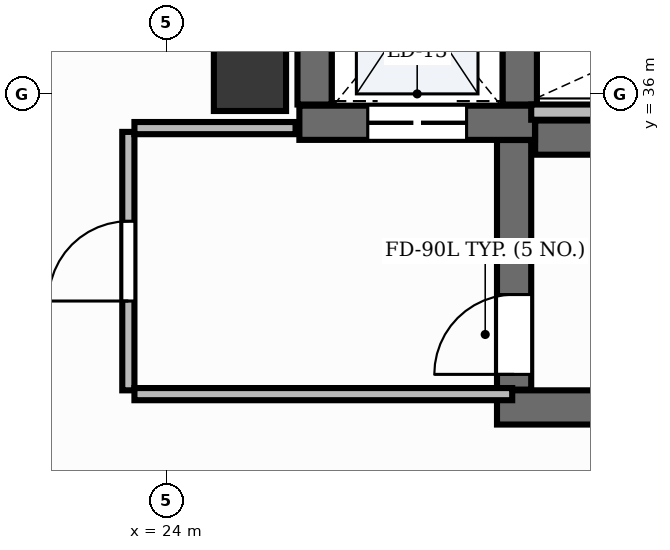
"""IFC4 building model, lengths in metres.
Left out: names, types, materials, properties, quantities, classifications, styles, units other than length and angle.
Written with IfcOpenShell. Run it as: python <this file> out.ifc"""

import sys

from ifc_helpers import new_model, si_unit, direction, frame, frame_2d, origin, origin_2d, place, context, subcontext, project, spatial, rectangle, extrude, element, fill, save


model = new_model("IFC4")
c1 = context("Model", 3, precision=1e-05, world=origin(), true_north=direction((0.0, 1.0)))
c2 = subcontext(c1, "Body", "Model", "MODEL_VIEW")
j1 = project(units=[si_unit("LENGTHUNIT", "METRE"), si_unit("PLANEANGLEUNIT", "RADIAN")], contexts=[c1])
p1 = place(None, origin())
s1 = spatial("IfcSite", under=j1, at=p1, CompositionType="ELEMENT")
p2 = place(p1, origin())
s2 = spatial("IfcBuilding", under=s1, at=p2, CompositionType="ELEMENT")
p3 = place(p2, frame((0.0, 0.0, 63.6)))
s3 = spatial("IfcBuildingStorey", under=s2, at=p3, CompositionType="ELEMENT", Elevation=63.6)
p4 = place(p3, frame((28.852, 35.425, 0.0), z_axis=(0.0, 0.0, 1.0), x_axis=(1.0, 0.0, 0.0)))
e1 = element("IfcWall", 1, at=p4, inside=s3, PredefinedType="SHEAR", context=c2, shape_type="SweptSolid", body=[
    extrude(rectangle(XDim=8.248, YDim=0.45, at=frame_2d((4.124, 0.0))), origin(), (0.0, 0.0, 1.0), 3.9),
])
p5 = place(p3, frame((28.35, 31.875, 0.0), z_axis=(0.0, 0.0, 1.0), x_axis=(1.0, 0.0, 0.0)))
e2 = element("IfcWall", 2, at=p5, inside=s3, PredefinedType="SHEAR", context=c2, shape_type="SweptSolid", body=[
    extrude(rectangle(XDim=8.75, YDim=0.45, at=frame_2d((4.375, 0.0))), origin(), (0.0, 0.0, 1.0), 3.9),
])
p6 = place(p3, frame((28.575, 32.11, 0.0), z_axis=(0.0, 0.0, 1.0), x_axis=(0.0, 1.0, 0.0)))
e3 = element("IfcWall", 3, at=p6, inside=s3, PredefinedType="SHEAR", context=c2, shape_type="SweptSolid", body=[
    extrude(rectangle(XDim=3.283, YDim=0.45, at=frame_2d((1.642, 0.0))), origin(), (0.0, 0.0, 1.0), 3.9),
])
p7 = place(p6, frame((0.2, 0.0, 0.0)))
e4 = element("IfcOpeningElement", 4, at=p7, cuts=e3, PredefinedType="OPENING", context=c2, shape_type="SweptSolid", body=[
    extrude(rectangle(XDim=1.05, YDim=2.15, at=frame_2d((0.525, 1.075))), frame((0.0, 0.24, 0.0), z_axis=(0.0, -1.0, 0.0), x_axis=(1.0, 0.0, 0.0)), (0.0, 0.0, 1.0), 0.48),
])
p8 = place(p3, frame((25.75, 35.62, 0.0), z_axis=(0.0, 0.0, 1.0), x_axis=(1.0, 0.0, 0.0)))
e5 = element("IfcWall", 5, at=p8, inside=s3, PredefinedType="SHEAR", context=c2, shape_type="SweptSolid", body=[
    extrude(rectangle(XDim=3.1, YDim=0.45, at=frame_2d((1.55, 0.0))), origin(), (0.0, 0.0, 1.0), 3.9),
])
p9 = place(p8, frame((0.9, 0.0, 0.0)))
e6 = element("IfcOpeningElement", 6, at=p9, cuts=e5, PredefinedType="OPENING", context=c2, shape_type="SweptSolid", body=[
    extrude(rectangle(XDim=1.3, YDim=2.2, at=frame_2d((0.65, 1.1))), frame((0.0, 0.24, 0.0), z_axis=(0.0, -1.0, 0.0), x_axis=(1.0, 0.0, 0.0)), (0.0, 0.0, 1.0), 0.48),
])
for number, where, z_axis, x_axis in (
    (7, (25.95, 35.86, 0.0), (0.0, 0.0, 1.0), (0.0, 1.0, 0.0)),
    (8, (28.65, 35.86, 0.0), (0.0, 0.0, 1.0), (0.0, 1.0, 0.0)),
):
    element("IfcWall", number, at=place(p3, frame(where, z_axis=z_axis, x_axis=x_axis)), inside=s3, PredefinedType="SHEAR", context=c2, shape_type="SweptSolid", body=[
        extrude(rectangle(XDim=2.7, YDim=0.45, at=frame_2d((1.35, 0.0))), origin(), (0.0, 0.0, 1.0), 3.9),
    ])
p10 = place(p3, frame((25.1, 36.25, -0.0), z_axis=(0.0, 0.0, 1.0), x_axis=(1.0, 0.0, 0.0)))
e9 = element("IfcColumn", 9, at=p10, inside=s3, PredefinedType="PILASTER", context=c2, shape_type="SweptSolid", body=[
    extrude(rectangle(XDim=0.95, YDim=0.95, at=origin_2d()), origin(), (0.0, 0.0, 1.0), 3.901),
])
p11 = place(p3, frame((28.8, 35.76, 0.0), z_axis=(0.0, 0.0, 1.0), x_axis=(1.0, 0.0, 0.0)))
e10 = element("IfcWall", 10, at=p11, inside=s3, PredefinedType="PARTITIONING", context=c2, shape_type="SweptSolid", body=[
    extrude(rectangle(XDim=4.57, YDim=0.2, at=frame_2d((2.285, 0.0))), origin(), (0.0, 0.0, 1.0), 2.91),
])
p12 = place(p3, frame((23.5, 32.1, 0.0), z_axis=(0.0, 0.0, 1.0), x_axis=(0.0, 1.0, 0.0)))
e11 = element("IfcWall", 11, at=p12, inside=s3, PredefinedType="PARTITIONING", context=c2, shape_type="SweptSolid", body=[
    extrude(rectangle(XDim=3.4, YDim=0.16, at=frame_2d((1.7, 0.0))), origin(), (0.0, 0.0, 1.0), 2.91),
])
p13 = place(p12, frame((1.175, 0.0, 0.0)))
e12 = element("IfcOpeningElement", 12, at=p13, cuts=e11, PredefinedType="OPENING", context=c2, shape_type="SweptSolid", body=[
    extrude(rectangle(XDim=1.05, YDim=2.15, at=frame_2d((0.525, 1.075))), frame((0.0, 0.095, 0.0), z_axis=(0.0, -1.0, 0.0), x_axis=(1.0, 0.0, 0.0)), (0.0, 0.0, 1.0), 0.19),
])
p14 = place(p3, frame((23.58, 32.05, 0.0), z_axis=(0.0, 0.0, 1.0), x_axis=(1.0, 0.0, 0.0)))
e13 = element("IfcWall", 13, at=p14, inside=s3, PredefinedType="PARTITIONING", context=c2, shape_type="SweptSolid", body=[
    extrude(rectangle(XDim=4.97, YDim=0.16, at=frame_2d((2.485, 0.0))), origin(), (0.0, 0.0, 1.0), 2.91),
])
p15 = place(p3, frame((23.58, 35.55, 0.0), z_axis=(0.0, 0.0, 1.0), x_axis=(1.0, 0.0, 0.0)))
e14 = element("IfcWall", 14, at=p15, inside=s3, PredefinedType="PARTITIONING", context=c2, shape_type="SweptSolid", body=[
    extrude(rectangle(XDim=2.12, YDim=0.16, at=frame_2d((1.06, 0.0))), origin(), (0.0, 0.0, 1.0), 2.91),
])
p16 = place(p7, origin())
e15 = element("IfcDoor", 15, at=p16, inside=s3, OperationType="SINGLE_SWING_LEFT", PredefinedType="DOOR", context=c2, shape_type="SweptSolid", body=[
    extrude(rectangle(XDim=1.05, YDim=2.15, at=frame_2d((0.525, 1.075))), frame((0.0, 0.025, 0.0), z_axis=(0.0, -1.0, 0.0), x_axis=(1.0, 0.0, 0.0)), (0.0, 0.0, 1.0), 0.05),
])
fill(e4, e15)
p17 = place(p9, origin())
e16 = element("IfcDoor", 16, at=p17, inside=s3, OperationType="DOUBLE_DOOR_SLIDING", PredefinedType="DOOR", context=c2, shape_type="SweptSolid", body=[
    extrude(rectangle(XDim=1.3, YDim=2.2, at=frame_2d((0.65, 1.1))), frame((0.0, 0.025, 0.0), z_axis=(0.0, -1.0, 0.0), x_axis=(1.0, 0.0, 0.0)), (0.0, 0.0, 1.0), 0.05),
])
fill(e6, e16)
p18 = place(p13, origin())
e17 = element("IfcDoor", 17, at=p18, inside=s3, OperationType="SINGLE_SWING_LEFT", PredefinedType="DOOR", context=c2, shape_type="SweptSolid", body=[
    extrude(rectangle(XDim=1.05, YDim=2.15, at=frame_2d((0.525, 1.075))), frame((0.0, 0.025, 0.0), z_axis=(0.0, -1.0, 0.0), x_axis=(1.0, 0.0, 0.0)), (0.0, 0.0, 1.0), 0.05),
])
fill(e12, e17)
save(model, sys.argv[1])
